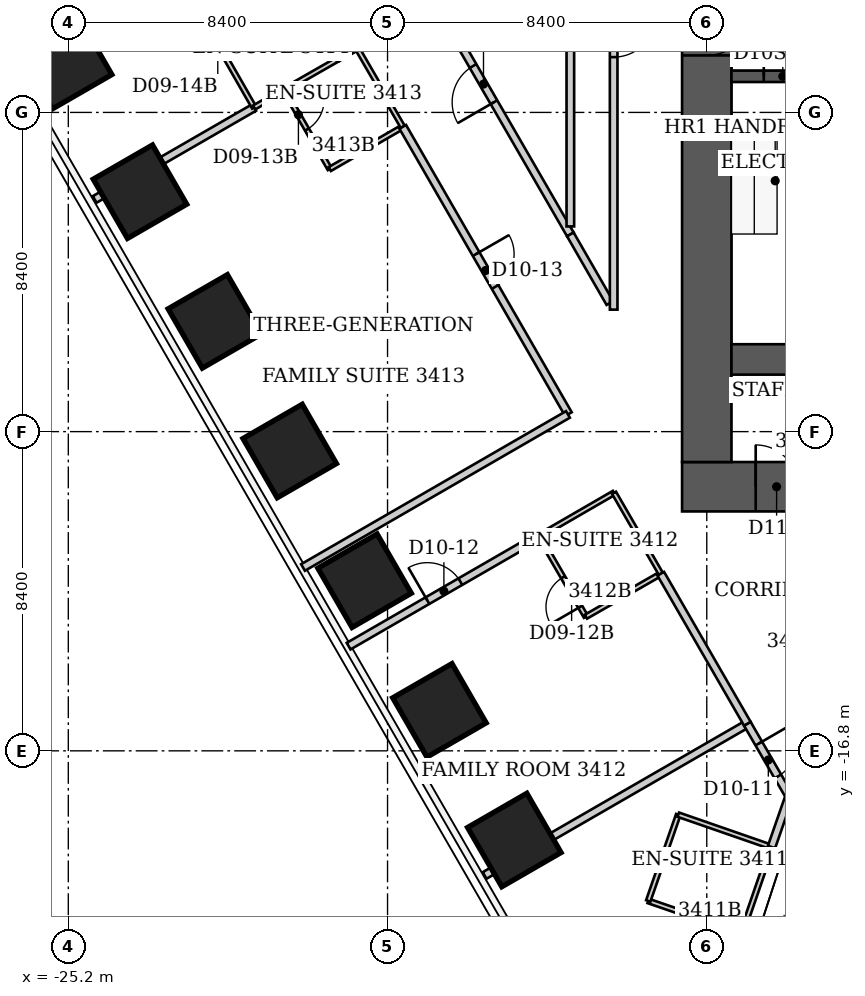
"""IFC4 building model, lengths in metres.
Left out: names, types, materials, properties, quantities, classifications, styles, units other than length and angle.
Written with IfcOpenShell. Run it as: python <this file> out.ifc"""

import sys

from ifc_helpers import new_model, si_unit, direction, frame, frame_2d, origin, origin_2d, place, context, subcontext, project, spatial, rectangle, extrude, element, fill, save


model = new_model("IFC4")
c1 = context("Model", 3, precision=1e-05, world=origin(), true_north=direction((0.0, 1.0)))
c2 = subcontext(c1, "Body", "Model", "MODEL_VIEW")
j1 = project(units=[si_unit("LENGTHUNIT", "METRE"), si_unit("PLANEANGLEUNIT", "RADIAN")], contexts=[c1])
p1 = place(None, origin())
s1 = spatial("IfcSite", under=j1, at=p1, CompositionType="ELEMENT")
p2 = place(p1, origin())
s2 = spatial("IfcBuilding", under=s1, at=p2, CompositionType="ELEMENT")
p3 = place(p2, frame((0.0, 0.0, 138.6)))
s3 = spatial("IfcBuildingStorey", under=s2, at=p3, CompositionType="ELEMENT", Elevation=138.6)
for number, where, z_axis, x_axis in (
    (1, (-13.464, -19.147, 0.0), (0.0, 0.0, 1.0), (-0.866, -0.5, 0.0)),
    (2, (-15.434, -15.735, 0.0), (0.0, 0.0, 1.0), (-0.866, -0.5, 0.0)),
    (3, (-17.404, -12.323, 0.0), (0.0, 0.0, 1.0), (-0.866, -0.5, 0.0)),
    (4, (-19.374, -8.911, 0.0), (0.0, 0.0, 1.0), (-0.866, -0.5, 0.0)),
    (5, (-21.344, -5.499, 0.0), (0.0, 0.0, 1.0), (-0.866, -0.5, 0.0)),
    (6, (-23.314, -2.087, 0.0), (0.0, 0.0, 1.0), (-0.866, -0.5, 0.0)),
    (7, (-25.284, 1.325, 0.0), (0.0, 0.0, 1.0), (-0.866, -0.5, 0.0)),
):
    element("IfcColumn", number, at=place(p3, frame(where, z_axis=z_axis, x_axis=x_axis)), inside=s3, PredefinedType="COLUMN", context=c2, shape_type="SweptSolid", body=[
        extrude(rectangle(XDim=1.8, YDim=1.8, at=origin_2d()), origin(), (0.0, 0.0, 1.0), 3.8),
    ])
p4 = place(p3, frame((-9.05, -9.85, 0.0), z_axis=(0.0, 0.0, 1.0), x_axis=(1.0, 0.0, 0.0)))
e8 = element("IfcWall", 8, at=p4, inside=s3, PredefinedType="SHEAR", context=c2, shape_type="SweptSolid", body=[
    extrude(rectangle(XDim=18.1, YDim=1.3, at=frame_2d((9.05, 0.0))), origin(), (0.0, 0.0, 1.0), 3.8),
])
p5 = place(p4, frame((1.938, 0.0, 0.0)))
e9 = element("IfcOpeningElement", 9, at=p5, cuts=e8, PredefinedType="OPENING", context=c2, shape_type="SweptSolid", body=[
    extrude(rectangle(XDim=1.1, YDim=2.2, at=frame_2d((0.55, 1.1))), frame((0.0, 0.65, 0.0), z_axis=(0.0, -1.0, 0.0), x_axis=(1.0, 0.0, 0.0)), (0.0, 0.0, 1.0), 1.3),
])
p6 = place(p4, frame((9.812, 0.0, 0.0)))
e10 = element("IfcOpeningElement", 10, at=p6, cuts=e8, PredefinedType="OPENING", context=c2, shape_type="SweptSolid", body=[
    extrude(rectangle(XDim=1.1, YDim=2.1, at=frame_2d((0.55, 1.05))), frame((0.0, 0.65, 0.0), z_axis=(0.0, -1.0, 0.0), x_axis=(1.0, 0.0, 0.0)), (0.0, 0.0, 1.0), 1.3),
])
p7 = place(p4, frame((12.438, 0.0, 0.0)))
e11 = element("IfcOpeningElement", 11, at=p7, cuts=e8, PredefinedType="OPENING", context=c2, shape_type="SweptSolid", body=[
    extrude(rectangle(XDim=1.1, YDim=2.1, at=frame_2d((0.55, 1.05))), frame((0.0, 0.65, 0.0), z_axis=(0.0, -1.0, 0.0), x_axis=(1.0, 0.0, 0.0)), (0.0, 0.0, 1.0), 1.3),
])
p8 = place(p4, frame((15.062, 0.0, 0.0)))
e12 = element("IfcOpeningElement", 12, at=p8, cuts=e8, PredefinedType="OPENING", context=c2, shape_type="SweptSolid", body=[
    extrude(rectangle(XDim=1.1, YDim=2.1, at=frame_2d((0.55, 1.05))), frame((0.0, 0.65, 0.0), z_axis=(0.0, -1.0, 0.0), x_axis=(1.0, 0.0, 0.0)), (0.0, 0.0, 1.0), 1.3),
])
p9 = place(p3, frame((-8.4, -9.2, 0.0), z_axis=(0.0, 0.0, 1.0), x_axis=(0.0, 1.0, 0.0)))
e13 = element("IfcWall", 13, at=p9, inside=s3, PredefinedType="SHEAR", context=c2, shape_type="SweptSolid", body=[
    extrude(rectangle(XDim=15.3, YDim=1.3, at=frame_2d((7.65, 0.0))), origin(), (0.0, 0.0, 1.0), 3.8),
])
p10 = place(p9, frame((10.7, 0.0, 0.0)))
e14 = element("IfcOpeningElement", 14, at=p10, cuts=e13, PredefinedType="OPENING", context=c2, shape_type="SweptSolid", body=[
    extrude(rectangle(XDim=1.2, YDim=2.2, at=frame_2d((0.6, 1.1))), frame((0.0, 0.65, 0.0), z_axis=(0.0, -1.0, 0.0), x_axis=(1.0, 0.0, 0.0)), (0.0, 0.0, 1.0), 1.3),
])
p11 = place(p3, frame((-7.75, -6.5, 0.0), z_axis=(0.0, 0.0, 1.0), x_axis=(1.0, 0.0, 0.0)))
e15 = element("IfcWall", 15, at=p11, inside=s3, PredefinedType="SHEAR", context=c2, shape_type="SweptSolid", body=[
    extrude(rectangle(XDim=15.5, YDim=0.8, at=frame_2d((7.75, 0.0))), origin(), (0.0, 0.0, 1.0), 3.8),
])
p12 = place(p3, frame((-7.75, 0.95, 0.0), z_axis=(0.0, 0.0, 1.0), x_axis=(1.0, 0.0, 0.0)))
e16 = element("IfcWall", 16, at=p12, inside=s3, PredefinedType="SHEAR", context=c2, shape_type="SweptSolid", body=[
    extrude(rectangle(XDim=3.0, YDim=0.3, at=frame_2d((1.5, 0.0))), origin(), (0.0, 0.0, 1.0), 3.8),
])
p13 = place(p12, frame((0.85, 0.0, 0.0)))
e17 = element("IfcOpeningElement", 17, at=p13, cuts=e16, PredefinedType="OPENING", context=c2, shape_type="SweptSolid", body=[
    extrude(rectangle(XDim=1.0, YDim=2.2, at=frame_2d((0.5, 1.1))), frame((0.0, 0.15, 0.0), z_axis=(0.0, -1.0, 0.0), x_axis=(1.0, 0.0, 0.0)), (0.0, 0.0, 1.0), 0.3),
])
p14 = place(p3, frame((-24.506, -2.29, 0.0), z_axis=(0.0, 0.0, 1.0), x_axis=(0.86626361228, 0.499587183622, 0.0)))
e18 = element("IfcWall", 18, at=p14, inside=s3, PredefinedType="PARTITIONING", context=c2, shape_type="SweptSolid", body=[
    extrude(rectangle(XDim=4.844, YDim=0.2, at=frame_2d((2.422, 0.0))), origin(), (0.0, 0.0, 1.0), 3.64),
])
p15 = place(p3, frame((-21.64, 2.45, 0.0), z_axis=(0.0, 0.0, 1.0), x_axis=(0.497288831399, -0.867585049529, 0.0)))
e19 = element("IfcWall", 19, at=p15, inside=s3, PredefinedType="PARTITIONING", context=c2, shape_type="SweptSolid", body=[
    extrude(rectangle(XDim=2.674, YDim=0.12, at=frame_2d((1.337, 0.0))), origin(), (0.0, 0.0, 1.0), 3.64),
])
p16 = place(p15, frame((0.3, 0.0, 0.0)))
e20 = element("IfcOpeningElement", 20, at=p16, cuts=e19, PredefinedType="OPENING", context=c2, shape_type="SweptSolid", body=[
    extrude(rectangle(XDim=0.9, YDim=2.03, at=frame_2d((0.45, 1.015))), frame((0.0, 0.06, 0.0), z_axis=(0.0, -1.0, 0.0), x_axis=(1.0, 0.0, 0.0)), (0.0, 0.0, 1.0), 0.12),
])
p17 = place(p3, frame((-20.31, 0.13, 0.0), z_axis=(0.0, 0.0, 1.0), x_axis=(0.864088651014, 0.503339649926, 0.0)))
e21 = element("IfcWall", 21, at=p17, inside=s3, PredefinedType="PARTITIONING", context=c2, shape_type="SweptSolid", body=[
    extrude(rectangle(XDim=0.914, YDim=0.12, at=frame_2d((0.457, 0.0))), origin(), (0.0, 0.0, 1.0), 3.64),
])
p18 = place(p3, frame((-19.52, 0.59, 0.0), z_axis=(0.0, 0.0, 1.0), x_axis=(0.499693115345, -0.866202511239, 0.0)))
e22 = element("IfcWall", 22, at=p18, inside=s3, PredefinedType="PARTITIONING", context=c2, shape_type="SweptSolid", body=[
    extrude(rectangle(XDim=2.401, YDim=0.12, at=frame_2d((1.201, 0.0))), origin(), (0.0, 0.0, 1.0), 3.64),
])
p19 = place(p18, frame((0.3, 0.0, 0.0)))
e23 = element("IfcOpeningElement", 23, at=p19, cuts=e22, PredefinedType="OPENING", context=c2, shape_type="SweptSolid", body=[
    extrude(rectangle(XDim=0.9, YDim=2.03, at=frame_2d((0.45, 1.015))), frame((0.0, 0.06, 0.0), z_axis=(0.0, -1.0, 0.0), x_axis=(1.0, 0.0, 0.0)), (0.0, 0.0, 1.0), 0.12),
])
p20 = place(p3, frame((-19.52, 0.59, 0.0), z_axis=(0.0, 0.0, 1.0), x_axis=(0.868013991935, 0.496539736381, 0.0)))
e24 = element("IfcWall", 24, at=p20, inside=s3, PredefinedType="PARTITIONING", context=c2, shape_type="SweptSolid", body=[
    extrude(rectangle(XDim=1.64, YDim=0.12, at=frame_2d((0.82, 0.0))), origin(), (0.0, 0.0, 1.0), 3.64),
])
p21 = place(p3, frame((-18.32, -1.49, 0.0), z_axis=(0.0, 0.0, 1.0), x_axis=(0.865732595383, 0.500506816428, 0.0)))
e25 = element("IfcWall", 25, at=p21, inside=s3, PredefinedType="PARTITIONING", context=c2, shape_type="SweptSolid", body=[
    extrude(rectangle(XDim=2.218, YDim=0.12, at=frame_2d((1.109, 0.0))), origin(), (0.0, 0.0, 1.0), 3.023),
])
p22 = place(p3, frame((-18.1, 1.41, 0.0), z_axis=(0.0, 0.0, 1.0), x_axis=(-0.497288831399, 0.867585049529, 0.0)))
e26 = element("IfcWall", 26, at=p22, inside=s3, PredefinedType="PARTITIONING", context=c2, shape_type="SweptSolid", body=[
    extrude(rectangle(XDim=2.674, YDim=0.12, at=frame_2d((1.337, 0.0))), origin(), (0.0, 0.0, 1.0), 3.64),
])
p23 = place(p3, frame((-18.097, 1.404, 0.0), z_axis=(0.0, 0.0, 1.0), x_axis=(0.866823419736, 0.498615241441, 0.0)))
e27 = element("IfcWall", 27, at=p23, inside=s3, PredefinedType="PARTITIONING", context=c2, shape_type="SweptSolid", body=[
    extrude(rectangle(XDim=0.573, YDim=0.12, at=frame_2d((0.286, 0.0))), origin(), (0.0, 0.0, 1.0), 3.64),
])
p24 = place(p3, frame((-17.824, -14.045, 0.0), z_axis=(0.0, 0.0, 1.0), x_axis=(0.866007919525, 0.500030282404, 0.0)))
e28 = element("IfcWall", 28, at=p24, inside=s3, PredefinedType="PARTITIONING", context=c2, shape_type="SweptSolid", body=[
    extrude(rectangle(XDim=5.79, YDim=0.2, at=frame_2d((2.895, 0.0))), origin(), (0.0, 0.0, 1.0), 3.64),
])
p25 = place(p24, frame((2.395, 0.0, 0.0)))
e29 = element("IfcOpeningElement", 29, at=p25, cuts=e28, PredefinedType="OPENING", context=c2, shape_type="SweptSolid", body=[
    extrude(rectangle(XDim=1.0, YDim=2.13, at=frame_2d((0.5, 1.065))), frame((0.0, 0.1, 0.0), z_axis=(0.0, -1.0, 0.0), x_axis=(1.0, 0.0, 0.0)), (0.0, 0.0, 1.0), 0.2),
])
p26 = place(p3, frame((-17.6, 1.69, 0.0), z_axis=(0.0, 0.0, 1.0), x_axis=(0.501623408317, -0.865086097581, 0.0)))
e30 = element("IfcWall", 30, at=p26, inside=s3, PredefinedType="PARTITIONING", context=c2, shape_type="SweptSolid", body=[
    extrude(rectangle(XDim=2.393, YDim=0.12, at=frame_2d((1.196, 0.0))), origin(), (0.0, 0.0, 1.0), 3.64),
])
p27 = place(p3, frame((-16.4, -0.38, 0.0), z_axis=(0.0, 0.0, 1.0), x_axis=(0.499575523811, -0.866270336563, 0.0)))
e31 = element("IfcWall", 31, at=p27, inside=s3, PredefinedType="PARTITIONING", context=c2, shape_type="SweptSolid", body=[
    extrude(rectangle(XDim=8.727, YDim=0.2, at=frame_2d((4.364, 0.0))), origin(), (0.0, 0.0, 1.0), 3.64),
])
p28 = place(p27, frame((3.864, 0.0, 0.0)))
e32 = element("IfcOpeningElement", 32, at=p28, cuts=e31, PredefinedType="OPENING", context=c2, shape_type="SweptSolid", body=[
    extrude(rectangle(XDim=1.0, YDim=2.13, at=frame_2d((0.5, 1.065))), frame((0.0, 0.1, 0.0), z_axis=(0.0, -1.0, 0.0), x_axis=(1.0, 0.0, 0.0)), (0.0, 0.0, 1.0), 0.2),
])
p29 = place(p3, frame((-14.246, -20.08, 0.0), z_axis=(0.0, 0.0, 1.0), x_axis=(0.866178955952, 0.49973394548, 0.0)))
e33 = element("IfcWall", 33, at=p29, inside=s3, PredefinedType="PARTITIONING", context=c2, shape_type="SweptSolid", body=[
    extrude(rectangle(XDim=7.969, YDim=0.2, at=frame_2d((3.985, 0.0))), origin(), (0.0, 0.0, 1.0), 3.64),
])
p30 = place(p3, frame((-12.81, -11.15, 0.0), z_axis=(0.0, 0.0, 1.0), x_axis=(0.501813488763, -0.864975850817, 0.0)))
e34 = element("IfcWall", 34, at=p30, inside=s3, PredefinedType="PARTITIONING", context=c2, shape_type="SweptSolid", body=[
    extrude(rectangle(XDim=2.451, YDim=0.12, at=frame_2d((1.226, 0.0))), origin(), (0.0, 0.0, 1.0), 3.64),
])
p31 = place(p30, frame((1.251, 0.0, 0.0)))
e35 = element("IfcOpeningElement", 35, at=p31, cuts=e34, PredefinedType="OPENING", context=c2, shape_type="SweptSolid", body=[
    extrude(rectangle(XDim=0.9, YDim=2.03, at=frame_2d((0.45, 1.015))), frame((0.0, 0.06, 0.0), z_axis=(0.0, -1.0, 0.0), x_axis=(1.0, 0.0, 0.0)), (0.0, 0.0, 1.0), 0.12),
])
p32 = place(p3, frame((-12.81, -11.15, 0.0), z_axis=(0.0, 0.0, 1.0), x_axis=(0.865543766642, 0.500833293649, 0.0)))
e36 = element("IfcWall", 36, at=p32, inside=s3, PredefinedType="PARTITIONING", context=c2, shape_type="SweptSolid", body=[
    extrude(rectangle(XDim=2.276, YDim=0.12, at=frame_2d((1.138, 0.0))), origin(), (0.0, 0.0, 1.0), 3.64),
])
p33 = place(p3, frame((-12.053, -7.948, 0.0), z_axis=(0.0, 0.0, 1.0), x_axis=(-0.865882003792, -0.500248293859, 0.0)))
e37 = element("IfcWall", 37, at=p33, inside=s3, PredefinedType="PARTITIONING", context=c2, shape_type="SweptSolid", body=[
    extrude(rectangle(XDim=8.051, YDim=0.2, at=frame_2d((4.025, 0.0))), origin(), (0.0, 0.0, 1.0), 3.64),
])
p34 = place(p3, frame((-11.99, -3.21, 0.0), z_axis=(0.0, 0.0, 1.0), x_axis=(-0.500269138002, 0.865869961116, 0.0)))
e38 = element("IfcWall", 38, at=p34, inside=s3, PredefinedType="PARTITIONING", context=c2, shape_type="SweptSolid", body=[
    extrude(rectangle(XDim=9.135, YDim=0.2, at=frame_2d((4.568, 0.0))), origin(), (0.0, 0.0, 1.0), 3.64),
])
p35 = place(p34, frame((4.018, 0.0, 0.0)))
e39 = element("IfcOpeningElement", 39, at=p35, cuts=e38, PredefinedType="OPENING", context=c2, shape_type="SweptSolid", body=[
    extrude(rectangle(XDim=1.1, YDim=2.2, at=frame_2d((0.55, 1.1))), frame((0.0, 0.1, 0.0), z_axis=(0.0, -1.0, 0.0), x_axis=(1.0, 0.0, 0.0)), (0.0, 0.0, 1.0), 0.2),
])
p36 = place(p3, frame((-11.99, 10.98, 0.0), z_axis=(0.0, 0.0, 1.0), x_axis=(0.0, -1.0, 0.0)))
e40 = element("IfcWall", 40, at=p36, inside=s3, PredefinedType="PARTITIONING", context=c2, shape_type="SweptSolid", body=[
    extrude(rectangle(XDim=13.98, YDim=0.2, at=frame_2d((6.99, 0.0))), origin(), (0.0, 0.0, 1.0), 3.64),
])
p37 = place(p3, frame((-11.58, -13.27, 0.0), z_axis=(0.0, 0.0, 1.0), x_axis=(0.867428373024, 0.497562074192, 0.0)))
e41 = element("IfcWall", 41, at=p37, inside=s3, PredefinedType="PARTITIONING", context=c2, shape_type="SweptSolid", body=[
    extrude(rectangle(XDim=2.271, YDim=0.12, at=frame_2d((1.136, 0.0))), origin(), (0.0, 0.0, 1.0), 3.64),
])
p38 = place(p3, frame((-10.95, -5.017, 0.0), z_axis=(0.0, 0.0, 1.0), x_axis=(-0.498999092416, 0.866602507363, 0.0)))
e42 = element("IfcWall", 42, at=p38, inside=s3, PredefinedType="PARTITIONING", context=c2, shape_type="SweptSolid", body=[
    extrude(rectangle(XDim=2.085, YDim=0.2, at=frame_2d((1.042, 0.0))), origin(), (0.0, 0.0, 1.0), 3.64),
])
p39 = place(p3, frame((-10.85, 9.2, 0.0), z_axis=(0.0, 0.0, 1.0), x_axis=(0.0, -1.0, 0.0)))
e43 = element("IfcWall", 43, at=p39, inside=s3, PredefinedType="PARTITIONING", context=c2, shape_type="SweptSolid", body=[
    extrude(rectangle(XDim=14.39, YDim=0.2, at=frame_2d((7.195, 0.0))), origin(), (0.0, 0.0, 1.0), 3.64),
])
p40 = place(p39, frame((6.645, 0.0, 0.0)))
e44 = element("IfcOpeningElement", 44, at=p40, cuts=e43, PredefinedType="OPENING", context=c2, shape_type="SweptSolid", body=[
    extrude(rectangle(XDim=1.1, YDim=2.2, at=frame_2d((0.55, 1.1))), frame((0.0, 0.1, 0.0), z_axis=(0.0, -1.0, 0.0), x_axis=(1.0, 0.0, 0.0)), (0.0, 0.0, 1.0), 0.2),
])
p41 = place(p3, frame((-10.84, -10.01, 0.0), z_axis=(0.0, 0.0, 1.0), x_axis=(0.500089055364, -0.86597398154, 0.0)))
e45 = element("IfcWall", 45, at=p41, inside=s3, PredefinedType="PARTITIONING", context=c2, shape_type="SweptSolid", body=[
    extrude(rectangle(XDim=2.459, YDim=0.12, at=frame_2d((1.23, 0.0))), origin(), (0.0, 0.0, 1.0), 3.64),
])
p42 = place(p3, frame((-9.94, -20.75, 0.0), z_axis=(0.0, 0.0, 1.0), x_axis=(0.94515546045, -0.326620813149, 0.0)))
e46 = element("IfcWall", 46, at=p42, inside=s3, PredefinedType="PARTITIONING", context=c2, shape_type="SweptSolid", body=[
    extrude(rectangle(XDim=2.603, YDim=0.12, at=frame_2d((1.301, 0.0))), origin(), (0.0, 0.0, 1.0), 3.64),
])
p43 = place(p42, frame((1.403, 0.0, 0.0)))
e47 = element("IfcOpeningElement", 47, at=p43, cuts=e46, PredefinedType="OPENING", context=c2, shape_type="SweptSolid", body=[
    extrude(rectangle(XDim=0.9, YDim=2.03, at=frame_2d((0.45, 1.015))), frame((0.0, 0.06, 0.0), z_axis=(0.0, -1.0, 0.0), x_axis=(1.0, 0.0, 0.0)), (0.0, 0.0, 1.0), 0.12),
])
p44 = place(p3, frame((-9.61, -12.14, 0.0), z_axis=(0.0, 0.0, 1.0), x_axis=(0.499898533245, -0.866083977718, 0.0)))
e48 = element("IfcWall", 48, at=p44, inside=s3, PredefinedType="PARTITIONING", context=c2, shape_type="SweptSolid", body=[
    extrude(rectangle(XDim=4.561, YDim=0.2, at=frame_2d((2.281, 0.0))), origin(), (0.0, 0.0, 1.0), 3.64),
])
p45 = place(p3, frame((-9.15, -18.48, 0.0), z_axis=(0.0, 0.0, 1.0), x_axis=(-0.328693963496, -0.944436487203, 0.0)))
e49 = element("IfcWall", 49, at=p45, inside=s3, PredefinedType="PARTITIONING", context=c2, shape_type="SweptSolid", body=[
    extrude(rectangle(XDim=2.404, YDim=0.12, at=frame_2d((1.202, 0.0))), origin(), (0.0, 0.0, 1.0), 3.64),
])
p46 = place(p3, frame((-7.48, -21.6, 0.0), z_axis=(0.0, 0.0, 1.0), x_axis=(0.326492166492, 0.945199907543, 0.0)))
e50 = element("IfcWall", 50, at=p46, inside=s3, PredefinedType="PARTITIONING", context=c2, shape_type="SweptSolid", body=[
    extrude(rectangle(XDim=2.4, YDim=0.12, at=frame_2d((1.2, 0.0))), origin(), (0.0, 0.0, 1.0), 3.64),
])
p47 = place(p3, frame((-7.331, -16.091, 0.0), z_axis=(0.0, 0.0, 1.0), x_axis=(0.501518373175, -0.865146994081, 0.0)))
e51 = element("IfcWall", 51, at=p47, inside=s3, PredefinedType="PARTITIONING", context=c2, shape_type="SweptSolid", body=[
    extrude(rectangle(XDim=2.196, YDim=0.2, at=frame_2d((1.098, 0.0))), origin(), (0.0, 0.0, 1.0), 3.64),
])
p48 = place(p47, frame((0.598, 0.0, 0.0)))
e52 = element("IfcOpeningElement", 52, at=p48, cuts=e51, PredefinedType="OPENING", context=c2, shape_type="SweptSolid", body=[
    extrude(rectangle(XDim=1.0, YDim=2.13, at=frame_2d((0.5, 1.065))), frame((0.0, 0.1, 0.0), z_axis=(0.0, -1.0, 0.0), x_axis=(1.0, 0.0, 0.0)), (0.0, 0.0, 1.0), 0.2),
])
p49 = place(p3, frame((-6.7, -19.33, 0.0), z_axis=(0.0, 0.0, 1.0), x_axis=(-0.944753042377, 0.327782990589, 0.0)))
e53 = element("IfcWall", 53, at=p49, inside=s3, PredefinedType="PARTITIONING", context=c2, shape_type="SweptSolid", body=[
    extrude(rectangle(XDim=2.594, YDim=0.12, at=frame_2d((1.297, 0.0))), origin(), (0.0, 0.0, 1.0), 3.64),
])
p50 = place(p3, frame((-6.696, -19.331, 0.0), z_axis=(0.0, 0.0, 1.0), x_axis=(0.328298231075, 0.944574121746, 0.0)))
e54 = element("IfcWall", 54, at=p50, inside=s3, PredefinedType="PARTITIONING", context=c2, shape_type="SweptSolid", body=[
    extrude(rectangle(XDim=1.32, YDim=0.2, at=frame_2d((0.66, 0.0))), origin(), (0.0, 0.0, 1.0), 3.64),
])
p51 = place(p48, origin())
e55 = element("IfcDoor", 55, at=p51, inside=s3, OperationType="SINGLE_SWING_LEFT", PredefinedType="DOOR", context=c2, shape_type="SweptSolid", body=[
    extrude(rectangle(XDim=1.0, YDim=2.13, at=frame_2d((0.5, 1.065))), frame((0.0, 0.025, 0.0), z_axis=(0.0, -1.0, 0.0), x_axis=(1.0, 0.0, 0.0)), (0.0, 0.0, 1.0), 0.05),
])
fill(e52, e55)
p52 = place(p25, origin())
e56 = element("IfcDoor", 56, at=p52, inside=s3, OperationType="SINGLE_SWING_LEFT", PredefinedType="DOOR", context=c2, shape_type="SweptSolid", body=[
    extrude(rectangle(XDim=1.0, YDim=2.13, at=frame_2d((0.5, 1.065))), frame((0.0, 0.025, 0.0), z_axis=(0.0, -1.0, 0.0), x_axis=(1.0, 0.0, 0.0)), (0.0, 0.0, 1.0), 0.05),
])
fill(e29, e56)
p53 = place(p31, origin())
e57 = element("IfcDoor", 57, at=p53, inside=s3, OperationType="SINGLE_SWING_RIGHT", PredefinedType="DOOR", context=c2, shape_type="SweptSolid", body=[
    extrude(rectangle(XDim=0.9, YDim=2.03, at=frame_2d((0.45, 1.015))), frame((0.0, 0.025, 0.0), z_axis=(0.0, -1.0, 0.0), x_axis=(1.0, 0.0, 0.0)), (0.0, 0.0, 1.0), 0.05),
])
fill(e35, e57)
p54 = place(p28, origin())
e58 = element("IfcDoor", 58, at=p54, inside=s3, OperationType="SINGLE_SWING_LEFT", PredefinedType="DOOR", context=c2, shape_type="SweptSolid", body=[
    extrude(rectangle(XDim=1.0, YDim=2.13, at=frame_2d((0.5, 1.065))), frame((0.0, 0.025, 0.0), z_axis=(0.0, -1.0, 0.0), x_axis=(1.0, 0.0, 0.0)), (0.0, 0.0, 1.0), 0.05),
])
fill(e32, e58)
p55 = place(p19, origin())
e59 = element("IfcDoor", 59, at=p55, inside=s3, OperationType="SINGLE_SWING_LEFT", PredefinedType="DOOR", context=c2, shape_type="SweptSolid", body=[
    extrude(rectangle(XDim=0.9, YDim=2.03, at=frame_2d((0.45, 1.015))), frame((0.0, 0.025, 0.0), z_axis=(0.0, -1.0, 0.0), x_axis=(1.0, 0.0, 0.0)), (0.0, 0.0, 1.0), 0.05),
])
fill(e23, e59)
p56 = place(p16, origin())
e60 = element("IfcDoor", 60, at=p56, inside=s3, OperationType="SINGLE_SWING_LEFT", PredefinedType="DOOR", context=c2, shape_type="SweptSolid", body=[
    extrude(rectangle(XDim=0.9, YDim=2.03, at=frame_2d((0.45, 1.015))), frame((0.0, 0.025, 0.0), z_axis=(0.0, -1.0, 0.0), x_axis=(1.0, 0.0, 0.0)), (0.0, 0.0, 1.0), 0.05),
])
fill(e20, e60)
p57 = place(p35, origin())
e61 = element("IfcDoor", 61, at=p57, inside=s3, OperationType="SINGLE_SWING_LEFT", PredefinedType="DOOR", context=c2, shape_type="SweptSolid", body=[
    extrude(rectangle(XDim=1.1, YDim=2.2, at=frame_2d((0.55, 1.1))), frame((0.0, 0.025, 0.0), z_axis=(0.0, -1.0, 0.0), x_axis=(1.0, 0.0, 0.0)), (0.0, 0.0, 1.0), 0.05),
])
fill(e39, e61)
p58 = place(p40, origin())
e62 = element("IfcDoor", 62, at=p58, inside=s3, OperationType="SINGLE_SWING_LEFT", PredefinedType="DOOR", context=c2, shape_type="SweptSolid", body=[
    extrude(rectangle(XDim=1.1, YDim=2.2, at=frame_2d((0.55, 1.1))), frame((0.0, 0.025, 0.0), z_axis=(0.0, -1.0, 0.0), x_axis=(1.0, 0.0, 0.0)), (0.0, 0.0, 1.0), 0.05),
])
fill(e44, e62)
p59 = place(p13, origin())
e63 = element("IfcDoor", 63, at=p59, inside=s3, OperationType="SINGLE_SWING_LEFT", PredefinedType="DOOR", context=c2, shape_type="SweptSolid", body=[
    extrude(rectangle(XDim=1.0, YDim=2.2, at=frame_2d((0.5, 1.1))), frame((0.0, 0.025, 0.0), z_axis=(0.0, -1.0, 0.0), x_axis=(1.0, 0.0, 0.0)), (0.0, 0.0, 1.0), 0.05),
])
fill(e17, e63)
p60 = place(p10, origin())
e64 = element("IfcDoor", 64, at=p60, inside=s3, OperationType="SINGLE_SWING_RIGHT", PredefinedType="DOOR", context=c2, shape_type="SweptSolid", body=[
    extrude(rectangle(XDim=1.2, YDim=2.2, at=frame_2d((0.6, 1.1))), frame((0.0, 0.025, 0.0), z_axis=(0.0, -1.0, 0.0), x_axis=(1.0, 0.0, 0.0)), (0.0, 0.0, 1.0), 0.05),
])
fill(e14, e64)
p61 = place(p5, origin())
e65 = element("IfcDoor", 65, at=p61, inside=s3, OperationType="SINGLE_SWING_LEFT", PredefinedType="DOOR", context=c2, shape_type="SweptSolid", body=[
    extrude(rectangle(XDim=1.1, YDim=2.2, at=frame_2d((0.55, 1.1))), frame((0.0, 0.025, 0.0), z_axis=(0.0, -1.0, 0.0), x_axis=(1.0, 0.0, 0.0)), (0.0, 0.0, 1.0), 0.05),
])
fill(e9, e65)
save(model, sys.argv[1])
